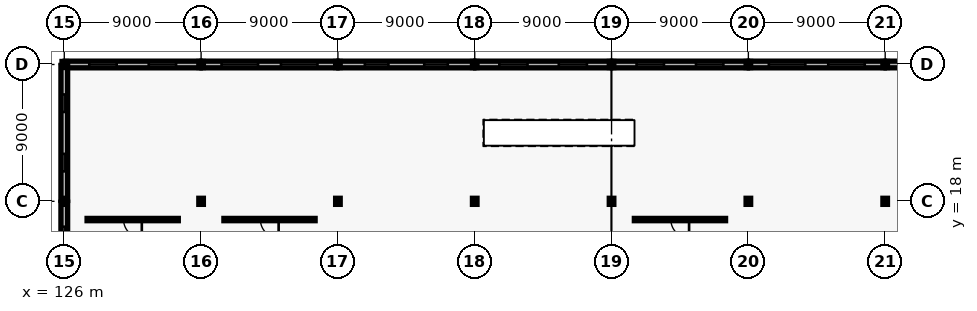
"""IFC4 building model, lengths in metres.
Left out: names, types, materials, properties, quantities, classifications, styles, units other than length and angle.
Written with IfcOpenShell. Run it as: python <this file> out.ifc"""

import sys

from ifc_helpers import new_model, si_unit, direction, frame, frame_2d, origin, origin_2d, place, context, subcontext, project, spatial, rectangle, i_section, extrude, element, fill, save


model = new_model("IFC4")
c1 = context("Model", 3, precision=1e-05, world=origin(), true_north=direction((0.0, 1.0)))
c2 = subcontext(c1, "Body", "Model", "MODEL_VIEW")
j1 = project(units=[si_unit("LENGTHUNIT", "METRE"), si_unit("PLANEANGLEUNIT", "RADIAN")], contexts=[c1])
p1 = place(None, origin())
s1 = spatial("IfcSite", under=j1, at=p1, CompositionType="ELEMENT")
p2 = place(p1, origin())
s2 = spatial("IfcBuilding", under=s1, at=p2, CompositionType="ELEMENT")
p3 = place(p2, frame((0.0, 0.0, 5.4)))
s3 = spatial("IfcBuildingStorey", under=s2, at=p3, CompositionType="ELEMENT", Elevation=5.4)
for number, where, z_axis, x_axis in (
    (1, (126.0, 18.0, 0.0), (0.0, 0.0, 1.0), (1.0, 0.0, 0.0)),
    (2, (126.0, 27.0, 0.0), (0.0, 0.0, 1.0), (1.0, 0.0, 0.0)),
    (3, (135.0, 18.0, 0.0), (0.0, 0.0, 1.0), (1.0, 0.0, 0.0)),
    (4, (135.0, 27.0, 0.0), (0.0, 0.0, 1.0), (1.0, 0.0, 0.0)),
    (5, (144.0, 18.0, 0.0), (0.0, 0.0, 1.0), (1.0, 0.0, 0.0)),
    (6, (144.0, 27.0, 0.0), (0.0, 0.0, 1.0), (1.0, 0.0, 0.0)),
    (7, (153.0, 18.0, 0.0), (0.0, 0.0, 1.0), (1.0, 0.0, 0.0)),
    (8, (153.0, 27.0, 0.0), (0.0, 0.0, 1.0), (1.0, 0.0, 0.0)),
    (9, (162.0, 18.0, 0.0), (0.0, 0.0, 1.0), (1.0, 0.0, 0.0)),
    (10, (162.0, 27.0, 0.0), (0.0, 0.0, 1.0), (1.0, 0.0, 0.0)),
    (11, (171.0, 18.0, 0.0), (0.0, 0.0, 1.0), (1.0, 0.0, 0.0)),
    (12, (171.0, 27.0, 0.0), (0.0, 0.0, 1.0), (1.0, 0.0, 0.0)),
    (13, (180.0, 18.0, 0.0), (0.0, 0.0, 1.0), (1.0, 0.0, 0.0)),
    (14, (180.0, 27.0, 0.0), (0.0, 0.0, 1.0), (1.0, 0.0, 0.0)),
):
    element("IfcColumn", number, at=place(p3, frame(where, z_axis=z_axis, x_axis=x_axis)), inside=s3, PredefinedType="COLUMN", context=c2, shape_type="SweptSolid", body=[
        extrude(i_section(OverallWidth=0.3, OverallDepth=0.4, WebThickness=0.013, FlangeThickness=0.024, FilletRadius=0.027, at=origin_2d()), origin(), (0.0, 0.0, 1.0), 4.2),
    ])
p4 = place(p3, frame((126.06, 27.0, 0.0), z_axis=(0.0, 0.0, 1.0), x_axis=(1.0, 0.0, 0.0)))
e15 = element("IfcWall", 15, at=p4, inside=s3, PredefinedType="SOLIDWALL", context=c2, shape_type="SweptSolid", body=[
    extrude(rectangle(XDim=8.88, YDim=0.44, at=frame_2d((4.44, 0.0))), origin(), (0.0, 0.0, 1.0), 3.5),
])
p5 = place(p4, frame((1.586, 0.0, 0.9)))
e16 = element("IfcOpeningElement", 16, at=p5, cuts=e15, PredefinedType="OPENING", context=c2, shape_type="SweptSolid", body=[
    extrude(rectangle(XDim=1.8, YDim=2.1, at=frame_2d((0.9, 1.05))), frame((0.0, 0.23, 0.0), z_axis=(0.0, -1.0, 0.0), x_axis=(1.0, 0.0, 0.0)), (0.0, 0.0, 1.0), 0.46),
])
p6 = place(p4, frame((5.494, 0.0, 0.9)))
e17 = element("IfcOpeningElement", 17, at=p6, cuts=e15, PredefinedType="OPENING", context=c2, shape_type="SweptSolid", body=[
    extrude(rectangle(XDim=1.8, YDim=2.1, at=frame_2d((0.9, 1.05))), frame((0.0, 0.23, 0.0), z_axis=(0.0, -1.0, 0.0), x_axis=(1.0, 0.0, 0.0)), (0.0, 0.0, 1.0), 0.46),
])
p7 = place(p3, frame((135.06, 27.0, 0.0), z_axis=(0.0, 0.0, 1.0), x_axis=(1.0, 0.0, 0.0)))
e18 = element("IfcWall", 18, at=p7, inside=s3, PredefinedType="SOLIDWALL", context=c2, shape_type="SweptSolid", body=[
    extrude(rectangle(XDim=8.88, YDim=0.44, at=frame_2d((4.44, 0.0))), origin(), (0.0, 0.0, 1.0), 3.5),
])
p8 = place(p7, frame((1.286, 0.0, 0.9)))
e19 = element("IfcOpeningElement", 19, at=p8, cuts=e18, PredefinedType="OPENING", context=c2, shape_type="SweptSolid", body=[
    extrude(rectangle(XDim=2.4, YDim=2.1, at=frame_2d((1.2, 1.05))), frame((0.0, 0.23, 0.0), z_axis=(0.0, -1.0, 0.0), x_axis=(1.0, 0.0, 0.0)), (0.0, 0.0, 1.0), 0.46),
])
p9 = place(p7, frame((5.194, 0.0, 0.9)))
e20 = element("IfcOpeningElement", 20, at=p9, cuts=e18, PredefinedType="OPENING", context=c2, shape_type="SweptSolid", body=[
    extrude(rectangle(XDim=2.4, YDim=2.1, at=frame_2d((1.2, 1.05))), frame((0.0, 0.23, 0.0), z_axis=(0.0, -1.0, 0.0), x_axis=(1.0, 0.0, 0.0)), (0.0, 0.0, 1.0), 0.46),
])
p10 = place(p3, frame((144.06, 27.0, 0.0), z_axis=(0.0, 0.0, 1.0), x_axis=(1.0, 0.0, 0.0)))
e21 = element("IfcWall", 21, at=p10, inside=s3, PredefinedType="SOLIDWALL", context=c2, shape_type="SweptSolid", body=[
    extrude(rectangle(XDim=8.88, YDim=0.44, at=frame_2d((4.44, 0.0))), origin(), (0.0, 0.0, 1.0), 3.5),
])
p11 = place(p10, frame((1.711, 0.0, 0.9)))
e22 = element("IfcOpeningElement", 22, at=p11, cuts=e21, PredefinedType="OPENING", context=c2, shape_type="SweptSolid", body=[
    extrude(rectangle(XDim=1.55, YDim=1.95, at=frame_2d((0.775, 0.975))), frame((0.0, 0.23, 0.0), z_axis=(0.0, -1.0, 0.0), x_axis=(1.0, 0.0, 0.0)), (0.0, 0.0, 1.0), 0.46),
])
p12 = place(p10, frame((5.619, 0.0, 0.9)))
e23 = element("IfcOpeningElement", 23, at=p12, cuts=e21, PredefinedType="OPENING", context=c2, shape_type="SweptSolid", body=[
    extrude(rectangle(XDim=1.55, YDim=1.95, at=frame_2d((0.775, 0.975))), frame((0.0, 0.23, 0.0), z_axis=(0.0, -1.0, 0.0), x_axis=(1.0, 0.0, 0.0)), (0.0, 0.0, 1.0), 0.46),
])
p13 = place(p3, frame((153.06, 27.0, 0.0), z_axis=(0.0, 0.0, 1.0), x_axis=(1.0, 0.0, 0.0)))
e24 = element("IfcWall", 24, at=p13, inside=s3, PredefinedType="SOLIDWALL", context=c2, shape_type="SweptSolid", body=[
    extrude(rectangle(XDim=8.88, YDim=0.44, at=frame_2d((4.44, 0.0))), origin(), (0.0, 0.0, 1.0), 3.5),
])
p14 = place(p13, frame((1.561, 0.0, 0.9)))
e25 = element("IfcOpeningElement", 25, at=p14, cuts=e24, PredefinedType="OPENING", context=c2, shape_type="SweptSolid", body=[
    extrude(rectangle(XDim=1.85, YDim=2.05, at=frame_2d((0.925, 1.025))), frame((0.0, 0.23, 0.0), z_axis=(0.0, -1.0, 0.0), x_axis=(1.0, 0.0, 0.0)), (0.0, 0.0, 1.0), 0.46),
])
p15 = place(p13, frame((5.469, 0.0, 0.9)))
e26 = element("IfcOpeningElement", 26, at=p15, cuts=e24, PredefinedType="OPENING", context=c2, shape_type="SweptSolid", body=[
    extrude(rectangle(XDim=1.85, YDim=2.05, at=frame_2d((0.925, 1.025))), frame((0.0, 0.23, 0.0), z_axis=(0.0, -1.0, 0.0), x_axis=(1.0, 0.0, 0.0)), (0.0, 0.0, 1.0), 0.46),
])
p16 = place(p3, frame((162.06, 27.0, 0.0), z_axis=(0.0, 0.0, 1.0), x_axis=(1.0, 0.0, 0.0)))
e27 = element("IfcWall", 27, at=p16, inside=s3, PredefinedType="SOLIDWALL", context=c2, shape_type="SweptSolid", body=[
    extrude(rectangle(XDim=8.88, YDim=0.44, at=frame_2d((4.44, 0.0))), origin(), (0.0, 0.0, 1.0), 3.5),
])
p17 = place(p16, frame((1.586, 0.0, 0.9)))
e28 = element("IfcOpeningElement", 28, at=p17, cuts=e27, PredefinedType="OPENING", context=c2, shape_type="SweptSolid", body=[
    extrude(rectangle(XDim=1.8, YDim=2.1, at=frame_2d((0.9, 1.05))), frame((0.0, 0.23, 0.0), z_axis=(0.0, -1.0, 0.0), x_axis=(1.0, 0.0, 0.0)), (0.0, 0.0, 1.0), 0.46),
])
p18 = place(p16, frame((5.494, 0.0, 0.9)))
e29 = element("IfcOpeningElement", 29, at=p18, cuts=e27, PredefinedType="OPENING", context=c2, shape_type="SweptSolid", body=[
    extrude(rectangle(XDim=1.8, YDim=2.1, at=frame_2d((0.9, 1.05))), frame((0.0, 0.23, 0.0), z_axis=(0.0, -1.0, 0.0), x_axis=(1.0, 0.0, 0.0)), (0.0, 0.0, 1.0), 0.46),
])
p19 = place(p3, frame((171.06, 27.0, 0.0), z_axis=(0.0, 0.0, 1.0), x_axis=(1.0, 0.0, 0.0)))
e30 = element("IfcWall", 30, at=p19, inside=s3, PredefinedType="SOLIDWALL", context=c2, shape_type="SweptSolid", body=[
    extrude(rectangle(XDim=8.88, YDim=0.44, at=frame_2d((4.44, 0.0))), origin(), (0.0, 0.0, 1.0), 3.5),
])
p20 = place(p19, frame((1.286, 0.0, 0.9)))
e31 = element("IfcOpeningElement", 31, at=p20, cuts=e30, PredefinedType="OPENING", context=c2, shape_type="SweptSolid", body=[
    extrude(rectangle(XDim=2.4, YDim=2.1, at=frame_2d((1.2, 1.05))), frame((0.0, 0.23, 0.0), z_axis=(0.0, -1.0, 0.0), x_axis=(1.0, 0.0, 0.0)), (0.0, 0.0, 1.0), 0.46),
])
p21 = place(p19, frame((5.194, 0.0, 0.9)))
e32 = element("IfcOpeningElement", 32, at=p21, cuts=e30, PredefinedType="OPENING", context=c2, shape_type="SweptSolid", body=[
    extrude(rectangle(XDim=2.4, YDim=2.1, at=frame_2d((1.2, 1.05))), frame((0.0, 0.23, 0.0), z_axis=(0.0, -1.0, 0.0), x_axis=(1.0, 0.0, 0.0)), (0.0, 0.0, 1.0), 0.46),
])
p22 = place(p3, frame((180.06, 27.0, 0.0), z_axis=(0.0, 0.0, 1.0), x_axis=(1.0, 0.0, 0.0)))
e33 = element("IfcWall", 33, at=p22, inside=s3, PredefinedType="SOLIDWALL", context=c2, shape_type="SweptSolid", body=[
    extrude(rectangle(XDim=8.88, YDim=0.44, at=frame_2d((4.44, 0.0))), origin(), (0.0, 0.0, 1.0), 3.5),
])
p23 = place(p22, frame((1.711, 0.0, 0.9)))
e34 = element("IfcOpeningElement", 34, at=p23, cuts=e33, PredefinedType="OPENING", context=c2, shape_type="SweptSolid", body=[
    extrude(rectangle(XDim=1.55, YDim=1.95, at=frame_2d((0.775, 0.975))), frame((0.0, 0.23, 0.0), z_axis=(0.0, -1.0, 0.0), x_axis=(1.0, 0.0, 0.0)), (0.0, 0.0, 1.0), 0.46),
])
p24 = place(p22, frame((5.619, 0.0, 0.9)))
e35 = element("IfcOpeningElement", 35, at=p24, cuts=e33, PredefinedType="OPENING", context=c2, shape_type="SweptSolid", body=[
    extrude(rectangle(XDim=1.55, YDim=1.95, at=frame_2d((0.775, 0.975))), frame((0.0, 0.23, 0.0), z_axis=(0.0, -1.0, 0.0), x_axis=(1.0, 0.0, 0.0)), (0.0, 0.0, 1.0), 0.46),
])
p25 = place(p3, frame((126.0, 9.06, 0.0), z_axis=(0.0, 0.0, 1.0), x_axis=(0.0, 1.0, 0.0)))
e36 = element("IfcWall", 36, at=p25, inside=s3, PredefinedType="SOLIDWALL", context=c2, shape_type="SweptSolid", body=[
    extrude(rectangle(XDim=8.88, YDim=0.44, at=frame_2d((4.44, 0.0))), origin(), (0.0, 0.0, 1.0), 3.5),
])
p26 = place(p25, frame((1.611, 0.0, 0.9)))
e37 = element("IfcOpeningElement", 37, at=p26, cuts=e36, PredefinedType="OPENING", context=c2, shape_type="SweptSolid", body=[
    extrude(rectangle(XDim=1.75, YDim=2.25, at=frame_2d((0.875, 1.125))), frame((0.0, 0.23, 0.0), z_axis=(0.0, -1.0, 0.0), x_axis=(1.0, 0.0, 0.0)), (0.0, 0.0, 1.0), 0.46),
])
p27 = place(p25, frame((5.519, 0.0, 0.9)))
e38 = element("IfcOpeningElement", 38, at=p27, cuts=e36, PredefinedType="OPENING", context=c2, shape_type="SweptSolid", body=[
    extrude(rectangle(XDim=1.75, YDim=2.25, at=frame_2d((0.875, 1.125))), frame((0.0, 0.23, 0.0), z_axis=(0.0, -1.0, 0.0), x_axis=(1.0, 0.0, 0.0)), (0.0, 0.0, 1.0), 0.46),
])
p28 = place(p3, frame((126.0, 18.06, 0.0), z_axis=(0.0, 0.0, 1.0), x_axis=(0.0, 1.0, 0.0)))
e39 = element("IfcWall", 39, at=p28, inside=s3, PredefinedType="SOLIDWALL", context=c2, shape_type="SweptSolid", body=[
    extrude(rectangle(XDim=8.88, YDim=0.44, at=frame_2d((4.44, 0.0))), origin(), (0.0, 0.0, 1.0), 3.5),
])
p29 = place(p28, frame((1.911, 0.0, 0.9)))
e40 = element("IfcOpeningElement", 40, at=p29, cuts=e39, PredefinedType="OPENING", context=c2, shape_type="SweptSolid", body=[
    extrude(rectangle(XDim=1.15, YDim=1.75, at=frame_2d((0.575, 0.875))), frame((0.0, 0.23, 0.0), z_axis=(0.0, -1.0, 0.0), x_axis=(1.0, 0.0, 0.0)), (0.0, 0.0, 1.0), 0.46),
])
p30 = place(p28, frame((5.819, 0.0, 0.9)))
e41 = element("IfcOpeningElement", 41, at=p30, cuts=e39, PredefinedType="OPENING", context=c2, shape_type="SweptSolid", body=[
    extrude(rectangle(XDim=1.15, YDim=1.75, at=frame_2d((0.575, 0.875))), frame((0.0, 0.23, 0.0), z_axis=(0.0, -1.0, 0.0), x_axis=(1.0, 0.0, 0.0)), (0.0, 0.0, 1.0), 0.46),
])
p31 = place(p3, frame((127.5, 16.8, 0.0), z_axis=(0.0, 0.0, 1.0), x_axis=(1.0, 0.0, 0.0)))
e42 = element("IfcWall", 42, at=p31, inside=s3, PredefinedType="PARTITIONING", context=c2, shape_type="SweptSolid", body=[
    extrude(rectangle(XDim=6.0, YDim=0.15, at=frame_2d((3.0, 0.0))), origin(), (0.0, 0.0, 1.0), 3.2),
])
p32 = place(p31, frame((2.4, 0.0, 0.0)))
e43 = element("IfcOpeningElement", 43, at=p32, cuts=e42, PredefinedType="OPENING", context=c2, shape_type="SweptSolid", body=[
    extrude(rectangle(XDim=1.2, YDim=2.2, at=frame_2d((0.6, 1.1))), frame((0.0, 0.085, 0.0), z_axis=(0.0, -1.0, 0.0), x_axis=(1.0, 0.0, 0.0)), (0.0, 0.0, 1.0), 0.17),
])
p33 = place(p3, frame((136.5, 16.8, 0.0), z_axis=(0.0, 0.0, 1.0), x_axis=(1.0, 0.0, 0.0)))
e44 = element("IfcWall", 44, at=p33, inside=s3, PredefinedType="PARTITIONING", context=c2, shape_type="SweptSolid", body=[
    extrude(rectangle(XDim=6.0, YDim=0.15, at=frame_2d((3.0, 0.0))), origin(), (0.0, 0.0, 1.0), 3.2),
])
p34 = place(p33, frame((2.4, 0.0, 0.0)))
e45 = element("IfcOpeningElement", 45, at=p34, cuts=e44, PredefinedType="OPENING", context=c2, shape_type="SweptSolid", body=[
    extrude(rectangle(XDim=1.2, YDim=2.2, at=frame_2d((0.6, 1.1))), frame((0.0, 0.085, 0.0), z_axis=(0.0, -1.0, 0.0), x_axis=(1.0, 0.0, 0.0)), (0.0, 0.0, 1.0), 0.17),
])
p35 = place(p3, frame((163.5, 16.8, 0.0), z_axis=(0.0, 0.0, 1.0), x_axis=(1.0, 0.0, 0.0)))
e46 = element("IfcWall", 46, at=p35, inside=s3, PredefinedType="PARTITIONING", context=c2, shape_type="SweptSolid", body=[
    extrude(rectangle(XDim=6.0, YDim=0.15, at=frame_2d((3.0, 0.0))), origin(), (0.0, 0.0, 1.0), 3.2),
])
p36 = place(p35, frame((2.4, 0.0, 0.0)))
e47 = element("IfcOpeningElement", 47, at=p36, cuts=e46, PredefinedType="OPENING", context=c2, shape_type="SweptSolid", body=[
    extrude(rectangle(XDim=1.2, YDim=2.2, at=frame_2d((0.6, 1.1))), frame((0.0, 0.085, 0.0), z_axis=(0.0, -1.0, 0.0), x_axis=(1.0, 0.0, 0.0)), (0.0, 0.0, 1.0), 0.17),
])
p37 = place(p5, origin())
e48 = element("IfcWindow", 48, at=p37, inside=s3, PartitioningType="SINGLE_PANEL", PredefinedType="WINDOW", context=c2, shape_type="SweptSolid", body=[
    extrude(rectangle(XDim=1.8, YDim=2.1, at=frame_2d((0.9, 1.05))), frame((0.0, 0.03, 0.0), z_axis=(0.0, -1.0, 0.0), x_axis=(1.0, 0.0, 0.0)), (0.0, 0.0, 1.0), 0.06),
])
fill(e16, e48)
p38 = place(p6, origin())
e49 = element("IfcWindow", 49, at=p38, inside=s3, PartitioningType="SINGLE_PANEL", PredefinedType="WINDOW", context=c2, shape_type="SweptSolid", body=[
    extrude(rectangle(XDim=1.8, YDim=2.1, at=frame_2d((0.9, 1.05))), frame((0.0, 0.03, 0.0), z_axis=(0.0, -1.0, 0.0), x_axis=(1.0, 0.0, 0.0)), (0.0, 0.0, 1.0), 0.06),
])
fill(e17, e49)
p39 = place(p8, origin())
e50 = element("IfcWindow", 50, at=p39, inside=s3, PartitioningType="SINGLE_PANEL", PredefinedType="WINDOW", context=c2, shape_type="SweptSolid", body=[
    extrude(rectangle(XDim=2.4, YDim=2.1, at=frame_2d((1.2, 1.05))), frame((0.0, 0.03, 0.0), z_axis=(0.0, -1.0, 0.0), x_axis=(1.0, 0.0, 0.0)), (0.0, 0.0, 1.0), 0.06),
])
fill(e19, e50)
p40 = place(p9, origin())
e51 = element("IfcWindow", 51, at=p40, inside=s3, PartitioningType="SINGLE_PANEL", PredefinedType="WINDOW", context=c2, shape_type="SweptSolid", body=[
    extrude(rectangle(XDim=2.4, YDim=2.1, at=frame_2d((1.2, 1.05))), frame((0.0, 0.03, 0.0), z_axis=(0.0, -1.0, 0.0), x_axis=(1.0, 0.0, 0.0)), (0.0, 0.0, 1.0), 0.06),
])
fill(e20, e51)
p41 = place(p11, origin())
e52 = element("IfcWindow", 52, at=p41, inside=s3, PartitioningType="SINGLE_PANEL", PredefinedType="WINDOW", context=c2, shape_type="SweptSolid", body=[
    extrude(rectangle(XDim=1.55, YDim=1.95, at=frame_2d((0.775, 0.975))), frame((0.0, 0.03, 0.0), z_axis=(0.0, -1.0, 0.0), x_axis=(1.0, 0.0, 0.0)), (0.0, 0.0, 1.0), 0.06),
])
fill(e22, e52)
p42 = place(p12, origin())
e53 = element("IfcWindow", 53, at=p42, inside=s3, PartitioningType="SINGLE_PANEL", PredefinedType="WINDOW", context=c2, shape_type="SweptSolid", body=[
    extrude(rectangle(XDim=1.55, YDim=1.95, at=frame_2d((0.775, 0.975))), frame((0.0, 0.03, 0.0), z_axis=(0.0, -1.0, 0.0), x_axis=(1.0, 0.0, 0.0)), (0.0, 0.0, 1.0), 0.06),
])
fill(e23, e53)
p43 = place(p14, origin())
e54 = element("IfcWindow", 54, at=p43, inside=s3, PartitioningType="SINGLE_PANEL", PredefinedType="WINDOW", context=c2, shape_type="SweptSolid", body=[
    extrude(rectangle(XDim=1.85, YDim=2.05, at=frame_2d((0.925, 1.025))), frame((0.0, 0.03, 0.0), z_axis=(0.0, -1.0, 0.0), x_axis=(1.0, 0.0, 0.0)), (0.0, 0.0, 1.0), 0.06),
])
fill(e25, e54)
p44 = place(p15, origin())
e55 = element("IfcWindow", 55, at=p44, inside=s3, PartitioningType="SINGLE_PANEL", PredefinedType="WINDOW", context=c2, shape_type="SweptSolid", body=[
    extrude(rectangle(XDim=1.85, YDim=2.05, at=frame_2d((0.925, 1.025))), frame((0.0, 0.03, 0.0), z_axis=(0.0, -1.0, 0.0), x_axis=(1.0, 0.0, 0.0)), (0.0, 0.0, 1.0), 0.06),
])
fill(e26, e55)
p45 = place(p17, origin())
e56 = element("IfcWindow", 56, at=p45, inside=s3, PartitioningType="SINGLE_PANEL", PredefinedType="WINDOW", context=c2, shape_type="SweptSolid", body=[
    extrude(rectangle(XDim=1.8, YDim=2.1, at=frame_2d((0.9, 1.05))), frame((0.0, 0.03, 0.0), z_axis=(0.0, -1.0, 0.0), x_axis=(1.0, 0.0, 0.0)), (0.0, 0.0, 1.0), 0.06),
])
fill(e28, e56)
p46 = place(p18, origin())
e57 = element("IfcWindow", 57, at=p46, inside=s3, PartitioningType="SINGLE_PANEL", PredefinedType="WINDOW", context=c2, shape_type="SweptSolid", body=[
    extrude(rectangle(XDim=1.8, YDim=2.1, at=frame_2d((0.9, 1.05))), frame((0.0, 0.03, 0.0), z_axis=(0.0, -1.0, 0.0), x_axis=(1.0, 0.0, 0.0)), (0.0, 0.0, 1.0), 0.06),
])
fill(e29, e57)
p47 = place(p20, origin())
e58 = element("IfcWindow", 58, at=p47, inside=s3, PartitioningType="SINGLE_PANEL", PredefinedType="WINDOW", context=c2, shape_type="SweptSolid", body=[
    extrude(rectangle(XDim=2.4, YDim=2.1, at=frame_2d((1.2, 1.05))), frame((0.0, 0.03, 0.0), z_axis=(0.0, -1.0, 0.0), x_axis=(1.0, 0.0, 0.0)), (0.0, 0.0, 1.0), 0.06),
])
fill(e31, e58)
p48 = place(p21, origin())
e59 = element("IfcWindow", 59, at=p48, inside=s3, PartitioningType="SINGLE_PANEL", PredefinedType="WINDOW", context=c2, shape_type="SweptSolid", body=[
    extrude(rectangle(XDim=2.4, YDim=2.1, at=frame_2d((1.2, 1.05))), frame((0.0, 0.03, 0.0), z_axis=(0.0, -1.0, 0.0), x_axis=(1.0, 0.0, 0.0)), (0.0, 0.0, 1.0), 0.06),
])
fill(e32, e59)
p49 = place(p27, origin())
e60 = element("IfcWindow", 60, at=p49, inside=s3, PartitioningType="SINGLE_PANEL", PredefinedType="WINDOW", context=c2, shape_type="SweptSolid", body=[
    extrude(rectangle(XDim=1.75, YDim=2.25, at=frame_2d((0.875, 1.125))), frame((0.0, 0.03, 0.0), z_axis=(0.0, -1.0, 0.0), x_axis=(1.0, 0.0, 0.0)), (0.0, 0.0, 1.0), 0.06),
])
fill(e38, e60)
p50 = place(p29, origin())
e61 = element("IfcWindow", 61, at=p50, inside=s3, PartitioningType="SINGLE_PANEL", PredefinedType="WINDOW", context=c2, shape_type="SweptSolid", body=[
    extrude(rectangle(XDim=1.15, YDim=1.75, at=frame_2d((0.575, 0.875))), frame((0.0, 0.03, 0.0), z_axis=(0.0, -1.0, 0.0), x_axis=(1.0, 0.0, 0.0)), (0.0, 0.0, 1.0), 0.06),
])
fill(e40, e61)
p51 = place(p30, origin())
e62 = element("IfcWindow", 62, at=p51, inside=s3, PartitioningType="SINGLE_PANEL", PredefinedType="WINDOW", context=c2, shape_type="SweptSolid", body=[
    extrude(rectangle(XDim=1.15, YDim=1.75, at=frame_2d((0.575, 0.875))), frame((0.0, 0.03, 0.0), z_axis=(0.0, -1.0, 0.0), x_axis=(1.0, 0.0, 0.0)), (0.0, 0.0, 1.0), 0.06),
])
fill(e41, e62)
p52 = place(p32, origin())
e63 = element("IfcDoor", 63, at=p52, inside=s3, OperationType="SINGLE_SWING_RIGHT", PredefinedType="DOOR", context=c2, shape_type="SweptSolid", body=[
    extrude(rectangle(XDim=1.2, YDim=2.2, at=frame_2d((0.6, 1.1))), frame((0.0, 0.025, 0.0), z_axis=(0.0, -1.0, 0.0), x_axis=(1.0, 0.0, 0.0)), (0.0, 0.0, 1.0), 0.05),
])
fill(e43, e63)
p53 = place(p34, origin())
e64 = element("IfcDoor", 64, at=p53, inside=s3, OperationType="SINGLE_SWING_RIGHT", PredefinedType="DOOR", context=c2, shape_type="SweptSolid", body=[
    extrude(rectangle(XDim=1.2, YDim=2.2, at=frame_2d((0.6, 1.1))), frame((0.0, 0.025, 0.0), z_axis=(0.0, -1.0, 0.0), x_axis=(1.0, 0.0, 0.0)), (0.0, 0.0, 1.0), 0.05),
])
fill(e45, e64)
p54 = place(p36, origin())
e65 = element("IfcDoor", 65, at=p54, inside=s3, OperationType="SINGLE_SWING_RIGHT", PredefinedType="DOOR", context=c2, shape_type="SweptSolid", body=[
    extrude(rectangle(XDim=1.2, YDim=2.2, at=frame_2d((0.6, 1.1))), frame((0.0, 0.025, 0.0), z_axis=(0.0, -1.0, 0.0), x_axis=(1.0, 0.0, 0.0)), (0.0, 0.0, 1.0), 0.05),
])
fill(e47, e65)
save(model, sys.argv[1])
